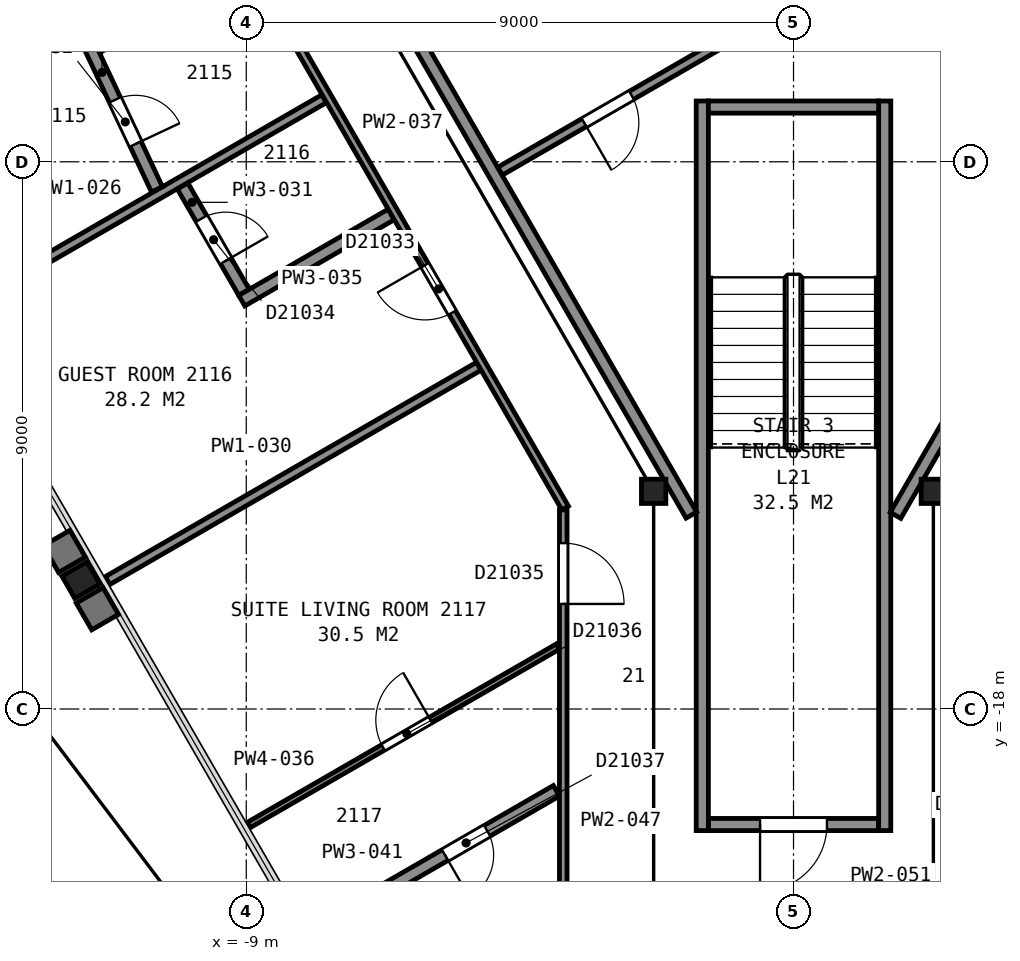
"""IFC4 building model, lengths in metres.
Left out: names, types, materials, properties, quantities, classifications, styles, units other than length and angle.
Written with IfcOpenShell. Run it as: python <this file> out.ifc"""

import sys

from ifc_helpers import new_model, si_unit, direction, frame, frame_2d, origin, origin_2d, place, context, subcontext, project, spatial, rectangle, i_section, extrude, element, fill, save


model = new_model("IFC4")
c1 = context("Model", 3, precision=1e-05, world=origin(), true_north=direction((0.0, 1.0)))
c2 = subcontext(c1, "Body", "Model", "MODEL_VIEW")
j1 = project(units=[si_unit("LENGTHUNIT", "METRE"), si_unit("PLANEANGLEUNIT", "RADIAN")], contexts=[c1])
p1 = place(None, origin())
s1 = spatial("IfcSite", under=j1, at=p1, CompositionType="ELEMENT")
p2 = place(p1, origin())
s2 = spatial("IfcBuilding", under=s1, at=p2, CompositionType="ELEMENT")
p3 = place(p2, frame((0.0, 0.0, 92.8)))
s3 = spatial("IfcBuildingStorey", under=s2, at=p3, CompositionType="ELEMENT", Elevation=92.8)
p4 = place(p3, frame((-11.72, -15.88, 0.0), z_axis=(0.0, 0.0, 1.0), x_axis=(-0.5, 0.866025403784, 0.0)))
e1 = element("IfcColumn", 1, at=p4, inside=s3, PredefinedType="COLUMN", context=c2, shape_type="SweptSolid", body=[
    extrude(i_section(OverallWidth=0.424, OverallDepth=0.475, WebThickness=0.048, FlangeThickness=0.077, FilletRadius=0.015, at=origin_2d()), origin(), (0.0, 0.0, 1.0), 3.6),
])
for number, where, z_axis, x_axis in (
    (2, (-2.3, -14.42, 0.0), (0.0, 0.0, 1.0), (1.0, 0.0, 0.0)),
    (3, (2.3, -14.42, 0.0), (0.0, 0.0, 1.0), (1.0, 0.0, 0.0)),
):
    element("IfcColumn", number, at=place(p3, frame(where, z_axis=z_axis, x_axis=x_axis)), inside=s3, PredefinedType="COLUMN", context=c2, shape_type="SweptSolid", body=[
        extrude(i_section(OverallWidth=0.401, OverallDepth=0.399, WebThickness=0.025, FlangeThickness=0.04, FilletRadius=0.015, at=origin_2d()), origin(), (0.0, 0.0, 1.0), 3.6),
    ])
p5 = place(p3, frame((-1.4, -19.9, 0.0), z_axis=(0.0, 0.0, 1.0), x_axis=(1.0, 0.0, 0.0)))
e4 = element("IfcWall", 4, at=p5, inside=s3, PredefinedType="PARTITIONING", context=c2, shape_type="SweptSolid", body=[
    extrude(rectangle(XDim=2.8, YDim=0.2, at=frame_2d((1.4, 0.0))), origin(), (0.0, 0.0, 1.0), 3.35),
])
p6 = place(p5, frame((0.85, 0.0, 0.0)))
e5 = element("IfcOpeningElement", 5, at=p6, cuts=e4, PredefinedType="OPENING", context=c2, shape_type="SweptSolid", body=[
    extrude(rectangle(XDim=1.1, YDim=2.1, at=frame_2d((0.55, 1.05))), frame((0.0, 0.11, 0.0), z_axis=(0.0, -1.0, 0.0), x_axis=(1.0, 0.0, 0.0)), (0.0, 0.0, 1.0), 0.22),
])
for number, where, z_axis, x_axis in (
    (6, (1.5, -8.0, 0.0), (0.0, 0.0, 1.0), (0.0, -1.0, 0.0)),
    (7, (-1.5, -8.0, 0.0), (0.0, 0.0, 1.0), (0.0, -1.0, 0.0)),
):
    element("IfcWall", number, at=place(p3, frame(where, z_axis=z_axis, x_axis=x_axis)), inside=s3, PredefinedType="PARTITIONING", context=c2, shape_type="SweptSolid", body=[
        extrude(rectangle(XDim=12.0, YDim=0.2, at=frame_2d((6.0, 0.0))), origin(), (0.0, 0.0, 1.0), 3.35),
    ])
p7 = place(p3, frame((-1.4, -8.1, 0.0), z_axis=(0.0, 0.0, 1.0), x_axis=(1.0, 0.0, 0.0)))
e8 = element("IfcWall", 8, at=p7, inside=s3, PredefinedType="PARTITIONING", context=c2, shape_type="SweptSolid", body=[
    extrude(rectangle(XDim=2.8, YDim=0.2, at=frame_2d((1.4, 0.0))), origin(), (0.0, 0.0, 1.0), 3.35),
])
p8 = place(p3, frame((-13.664, 5.946, 0.0), z_axis=(0.0, 0.0, 1.0), x_axis=(0.499994327219, -0.866028678941, 0.0)))
e9 = element("IfcWall", 9, at=p8, inside=s3, PredefinedType="PARTITIONING", context=c2, shape_type="SweptSolid", body=[
    extrude(rectangle(XDim=23.968, YDim=0.2, at=frame_2d((11.984, 0.0))), origin(), (0.0, 0.0, 1.0), 3.35),
])
p9 = place(p3, frame((-4.825, -9.154, 0.0), z_axis=(0.0, 0.0, 1.0), x_axis=(0.866023738697, 0.500002884005, 0.0)))
e10 = element("IfcWall", 10, at=p9, inside=s3, PredefinedType="PARTITIONING", context=c2, shape_type="SweptSolid", body=[
    extrude(rectangle(XDim=4.22, YDim=0.15, at=frame_2d((2.11, 0.0))), origin(), (0.0, 0.0, 1.0), 3.35),
])
p10 = place(p9, frame((1.595, 0.0, 0.0)))
e11 = element("IfcOpeningElement", 11, at=p10, cuts=e10, PredefinedType="OPENING", context=c2, shape_type="SweptSolid", body=[
    extrude(rectangle(XDim=0.9, YDim=2.1, at=frame_2d((0.45, 1.05))), frame((0.0, 0.085, 0.0), z_axis=(0.0, -1.0, 0.0), x_axis=(1.0, 0.0, 0.0)), (0.0, 0.0, 1.0), 0.17),
])
p11 = place(p3, frame((1.677, -14.815, 0.0), z_axis=(0.0, 0.0, 1.0), x_axis=(0.49999445743, 0.866028603765, 0.0)))
e12 = element("IfcWall", 12, at=p11, inside=s3, PredefinedType="PARTITIONING", context=c2, shape_type="SweptSolid", body=[
    extrude(rectangle(XDim=5.905, YDim=0.2, at=frame_2d((2.952, 0.0))), origin(), (0.0, 0.0, 1.0), 3.35),
])
p12 = place(p11, frame((3.855, 0.0, 0.0)))
e13 = element("IfcOpeningElement", 13, at=p12, cuts=e12, PredefinedType="OPENING", context=c2, shape_type="SweptSolid", body=[
    extrude(rectangle(XDim=1.8, YDim=2.1, at=frame_2d((0.9, 1.05))), frame((0.0, 0.11, 0.0), z_axis=(0.0, -1.0, 0.0), x_axis=(1.0, 0.0, 0.0)), (0.0, 0.0, 1.0), 0.22),
])
p13 = place(p3, frame((-10.037, -3.94, 0.0), z_axis=(0.0, 0.0, 1.0), x_axis=(-0.866063951978, -0.499933226626, 0.0)))
e14 = element("IfcWall", 14, at=p13, inside=s3, PredefinedType="PARTITIONING", context=c2, shape_type="SweptSolid", body=[
    extrude(rectangle(XDim=7.052, YDim=0.1, at=frame_2d((3.526, 0.0))), origin(), (0.0, 0.0, 1.0), 2.613),
])
p14 = place(p13, frame((2.998, 0.0, 0.0)))
e15 = element("IfcOpeningElement", 15, at=p14, cuts=e14, PredefinedType="OPENING", context=c2, shape_type="SweptSolid", body=[
    extrude(rectangle(XDim=0.9, YDim=2.1, at=frame_2d((0.45, 1.05))), frame((0.0, 0.06, 0.0), z_axis=(0.0, -1.0, 0.0), x_axis=(1.0, 0.0, 0.0)), (0.0, 0.0, 1.0), 0.12),
])
p15 = place(p3, frame((-13.823, -11.487, 0.0), z_axis=(0.0, 0.0, 1.0), x_axis=(0.865980767462, 0.500077304409, 0.0)))
e16 = element("IfcWall", 16, at=p15, inside=s3, PredefinedType="PARTITIONING", context=c2, shape_type="SweptSolid", body=[
    extrude(rectangle(XDim=7.047, YDim=0.15, at=frame_2d((3.524, 0.0))), origin(), (0.0, 0.0, 1.0), 2.613),
])
p16 = place(p3, frame((-11.585, -7.077, 0.0), z_axis=(0.0, 0.0, 1.0), x_axis=(0.425434257814, -0.904989332688, 0.0)))
e17 = element("IfcWall", 17, at=p16, inside=s3, PredefinedType="PARTITIONING", context=c2, shape_type="SweptSolid", body=[
    extrude(rectangle(XDim=2.625, YDim=0.2, at=frame_2d((1.313, 0.0))), origin(), (0.0, 0.0, 1.0), 2.613),
])
p17 = place(p16, frame((1.0, 0.0, 0.0)))
e18 = element("IfcOpeningElement", 18, at=p17, cuts=e17, PredefinedType="OPENING", context=c2, shape_type="SweptSolid", body=[
    extrude(rectangle(XDim=0.8, YDim=2.1, at=frame_2d((0.4, 1.05))), frame((0.0, 0.11, 0.0), z_axis=(0.0, -1.0, 0.0), x_axis=(1.0, 0.0, 0.0)), (0.0, 0.0, 1.0), 0.22),
])
p18 = place(p3, frame((-11.282, -15.888, 0.0), z_axis=(0.0, 0.0, 1.0), x_axis=(0.866031654768, 0.499989172823, 0.0)))
e19 = element("IfcWall", 19, at=p18, inside=s3, PredefinedType="PARTITIONING", context=c2, shape_type="SweptSolid", body=[
    extrude(rectangle(XDim=7.052, YDim=0.15, at=frame_2d((3.526, 0.0))), origin(), (0.0, 0.0, 1.0), 2.613),
])
p19 = place(p3, frame((-10.047, -9.398, 0.0), z_axis=(0.0, 0.0, 1.0), x_axis=(0.499935208997, -0.866062807656, 0.0)))
e20 = element("IfcWall", 20, at=p19, inside=s3, PredefinedType="PARTITIONING", context=c2, shape_type="SweptSolid", body=[
    extrude(rectangle(XDim=2.02, YDim=0.2, at=frame_2d((1.01, 0.0))), origin(), (0.0, 0.0, 1.0), 2.613),
])
p20 = place(p19, frame((0.62, 0.0, 0.0)))
e21 = element("IfcOpeningElement", 21, at=p20, cuts=e20, PredefinedType="OPENING", context=c2, shape_type="SweptSolid", body=[
    extrude(rectangle(XDim=0.8, YDim=2.1, at=frame_2d((0.4, 1.05))), frame((0.0, 0.11, 0.0), z_axis=(0.0, -1.0, 0.0), x_axis=(1.0, 0.0, 0.0)), (0.0, 0.0, 1.0), 0.22),
])
p21 = place(p3, frame((-9.074, -11.284, 0.0), z_axis=(0.0, 0.0, 1.0), x_axis=(0.866197046655, 0.499702587912, 0.0)))
e22 = element("IfcWall", 22, at=p21, inside=s3, PredefinedType="PARTITIONING", context=c2, shape_type="SweptSolid", body=[
    extrude(rectangle(XDim=2.837, YDim=0.2, at=frame_2d((1.418, 0.0))), origin(), (0.0, 0.0, 1.0), 2.613),
])
p22 = place(p3, frame((-3.875, -16.972, 0.0), z_axis=(0.0, 0.0, 1.0), x_axis=(-0.86602429061, -0.500001928069, 0.0)))
e23 = element("IfcWall", 23, at=p22, inside=s3, PredefinedType="PARTITIONING", context=c2, shape_type="SweptSolid", body=[
    extrude(rectangle(XDim=5.873, YDim=0.1, at=frame_2d((2.937, 0.0))), origin(), (0.0, 0.0, 1.0), 2.613),
])
p23 = place(p22, frame((2.419, 0.0, 0.0)))
e24 = element("IfcOpeningElement", 24, at=p23, cuts=e23, PredefinedType="OPENING", context=c2, shape_type="SweptSolid", body=[
    extrude(rectangle(XDim=0.9, YDim=2.1, at=frame_2d((0.45, 1.05))), frame((0.0, 0.06, 0.0), z_axis=(0.0, -1.0, 0.0), x_axis=(1.0, 0.0, 0.0)), (0.0, 0.0, 1.0), 0.12),
])
p24 = place(p3, frame((-3.756, -14.694, 0.0), z_axis=(0.0, 0.0, 1.0), x_axis=(-0.500051472265, 0.865995684219, 0.0)))
e25 = element("IfcWall", 25, at=p24, inside=s3, PredefinedType="PARTITIONING", context=c2, shape_type="SweptSolid", body=[
    extrude(rectangle(XDim=10.02, YDim=0.125, at=frame_2d((5.01, 0.0))), origin(), (0.0, 0.0, 1.0), 2.613),
])
p25 = place(p24, frame((3.711, 0.0, 0.0)))
e26 = element("IfcOpeningElement", 26, at=p25, cuts=e25, PredefinedType="OPENING", context=c2, shape_type="SweptSolid", body=[
    extrude(rectangle(XDim=0.9, YDim=2.1, at=frame_2d((0.45, 1.05))), frame((0.0, 0.073, 0.0), z_axis=(0.0, -1.0, 0.0), x_axis=(1.0, 0.0, 0.0)), (0.0, 0.0, 1.0), 0.145),
])
p26 = place(p3, frame((-3.899, -19.345, 0.0), z_axis=(0.0, 0.0, 1.0), x_axis=(-0.865971488458, -0.500093372459, 0.0)))
e27 = element("IfcWall", 27, at=p26, inside=s3, PredefinedType="PARTITIONING", context=c2, shape_type="SweptSolid", body=[
    extrude(rectangle(XDim=3.665, YDim=0.2, at=frame_2d((1.833, 0.0))), origin(), (0.0, 0.0, 1.0), 2.613),
])
p27 = place(p26, frame((1.315, 0.0, 0.0)))
e28 = element("IfcOpeningElement", 28, at=p27, cuts=e27, PredefinedType="OPENING", context=c2, shape_type="SweptSolid", body=[
    extrude(rectangle(XDim=0.8, YDim=2.1, at=frame_2d((0.4, 1.05))), frame((0.0, 0.11, 0.0), z_axis=(0.0, -1.0, 0.0), x_axis=(1.0, 0.0, 0.0)), (0.0, 0.0, 1.0), 0.22),
])
p28 = place(p3, frame((-3.787, -22.85, 0.0), z_axis=(0.0, 0.0, 1.0), x_axis=(0.0, 1.0, 0.0)))
e29 = element("IfcWall", 29, at=p28, inside=s3, PredefinedType="PARTITIONING", context=c2, shape_type="SweptSolid", body=[
    extrude(rectangle(XDim=8.125, YDim=0.125, at=frame_2d((4.062, 0.0))), origin(), (0.0, 0.0, 1.0), 2.613),
])
p29 = place(p28, frame((6.577, 0.0, 0.0)))
e30 = element("IfcOpeningElement", 30, at=p29, cuts=e29, PredefinedType="OPENING", context=c2, shape_type="SweptSolid", body=[
    extrude(rectangle(XDim=1.0, YDim=2.1, at=frame_2d((0.5, 1.05))), frame((0.0, 0.073, 0.0), z_axis=(0.0, -1.0, 0.0), x_axis=(1.0, 0.0, 0.0)), (0.0, 0.0, 1.0), 0.145),
])
p30 = place(p6, origin())
e31 = element("IfcDoor", 31, at=p30, inside=s3, OperationType="SINGLE_SWING_LEFT", PredefinedType="DOOR", context=c2, shape_type="SweptSolid", body=[
    extrude(rectangle(XDim=1.1, YDim=2.1, at=frame_2d((0.55, 1.05))), frame((0.0, 0.025, 0.0), z_axis=(0.0, -1.0, 0.0), x_axis=(1.0, 0.0, 0.0)), (0.0, 0.0, 1.0), 0.05),
])
fill(e5, e31)
p31 = place(p10, origin())
e32 = element("IfcDoor", 32, at=p31, inside=s3, OperationType="SINGLE_SWING_LEFT", PredefinedType="DOOR", context=c2, shape_type="SweptSolid", body=[
    extrude(rectangle(XDim=0.9, YDim=2.1, at=frame_2d((0.45, 1.05))), frame((0.0, 0.025, 0.0), z_axis=(0.0, -1.0, 0.0), x_axis=(1.0, 0.0, 0.0)), (0.0, 0.0, 1.0), 0.05),
])
fill(e11, e32)
p32 = place(p17, origin())
e33 = element("IfcDoor", 33, at=p32, inside=s3, OperationType="SINGLE_SWING_RIGHT", PredefinedType="DOOR", context=c2, shape_type="SweptSolid", body=[
    extrude(rectangle(XDim=0.8, YDim=2.1, at=frame_2d((0.4, 1.05))), frame((0.0, 0.025, 0.0), z_axis=(0.0, -1.0, 0.0), x_axis=(1.0, 0.0, 0.0)), (0.0, 0.0, 1.0), 0.05),
])
fill(e18, e33)
p33 = place(p20, origin())
e34 = element("IfcDoor", 34, at=p33, inside=s3, OperationType="SINGLE_SWING_RIGHT", PredefinedType="DOOR", context=c2, shape_type="SweptSolid", body=[
    extrude(rectangle(XDim=0.8, YDim=2.1, at=frame_2d((0.4, 1.05))), frame((0.0, 0.025, 0.0), z_axis=(0.0, -1.0, 0.0), x_axis=(1.0, 0.0, 0.0)), (0.0, 0.0, 1.0), 0.05),
])
fill(e21, e34)
p34 = place(p23, origin())
e35 = element("IfcDoor", 35, at=p34, inside=s3, OperationType="SINGLE_SWING_LEFT", PredefinedType="DOOR", context=c2, shape_type="SweptSolid", body=[
    extrude(rectangle(XDim=0.9, YDim=2.1, at=frame_2d((0.45, 1.05))), frame((0.0, 0.025, 0.0), z_axis=(0.0, -1.0, 0.0), x_axis=(1.0, 0.0, 0.0)), (0.0, 0.0, 1.0), 0.05),
])
fill(e24, e35)
p35 = place(p25, origin())
e36 = element("IfcDoor", 36, at=p35, inside=s3, OperationType="SINGLE_SWING_RIGHT", PredefinedType="DOOR", context=c2, shape_type="SweptSolid", body=[
    extrude(rectangle(XDim=0.9, YDim=2.1, at=frame_2d((0.45, 1.05))), frame((0.0, 0.025, 0.0), z_axis=(0.0, -1.0, 0.0), x_axis=(1.0, 0.0, 0.0)), (0.0, 0.0, 1.0), 0.05),
])
fill(e26, e36)
p36 = place(p27, origin())
e37 = element("IfcDoor", 37, at=p36, inside=s3, OperationType="SINGLE_SWING_RIGHT", PredefinedType="DOOR", context=c2, shape_type="SweptSolid", body=[
    extrude(rectangle(XDim=0.8, YDim=2.1, at=frame_2d((0.4, 1.05))), frame((0.0, 0.025, 0.0), z_axis=(0.0, -1.0, 0.0), x_axis=(1.0, 0.0, 0.0)), (0.0, 0.0, 1.0), 0.05),
])
fill(e28, e37)
p37 = place(p29, origin())
e38 = element("IfcDoor", 38, at=p37, inside=s3, OperationType="SINGLE_SWING_LEFT", PredefinedType="DOOR", context=c2, shape_type="SweptSolid", body=[
    extrude(rectangle(XDim=1.0, YDim=2.1, at=frame_2d((0.5, 1.05))), frame((0.0, 0.025, 0.0), z_axis=(0.0, -1.0, 0.0), x_axis=(1.0, 0.0, 0.0)), (0.0, 0.0, 1.0), 0.05),
])
fill(e30, e38)
save(model, sys.argv[1])
